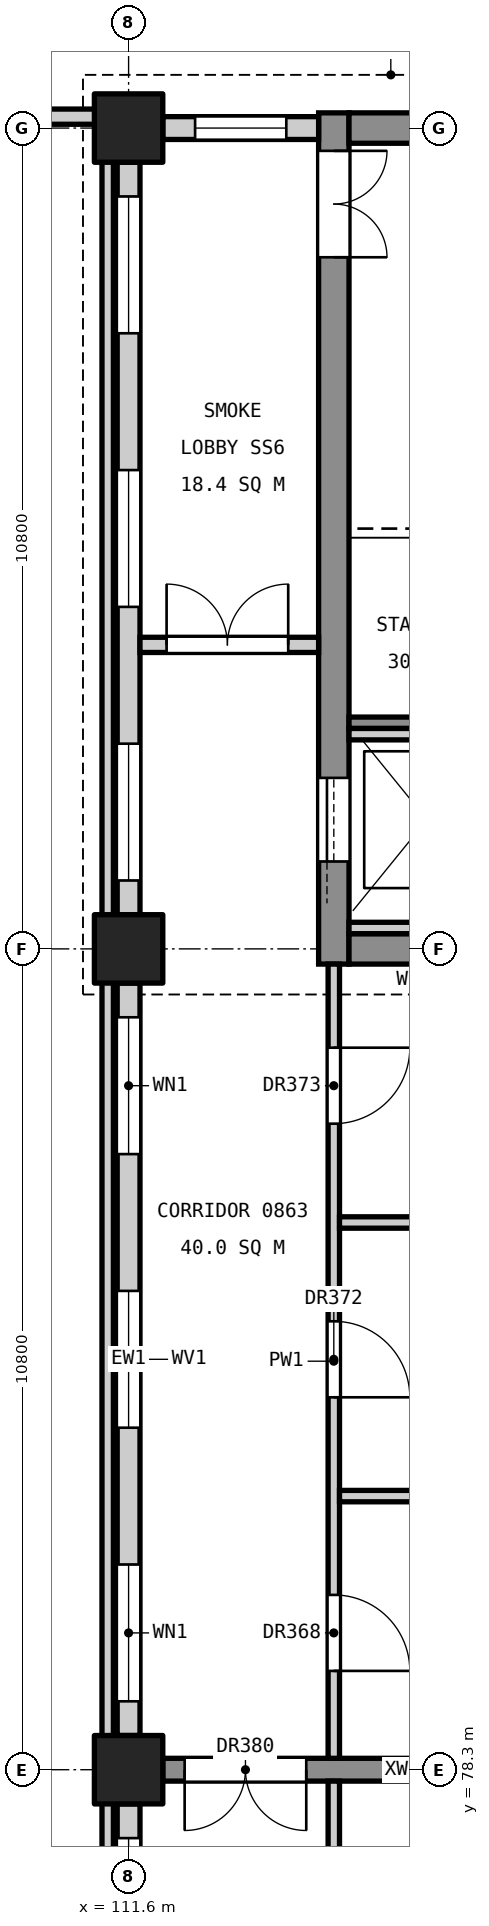
"""IFC4 building model, lengths in metres.
Left out: names, types, materials, properties, quantities, classifications, styles, units other than length and angle.
Written with IfcOpenShell. Run it as: python <this file> out.ifc"""

import sys

from ifc_helpers import new_model, si_unit, direction, frame, frame_2d, origin, origin_2d, place, context, subcontext, project, spatial, rectangle, extrude, element, fill, save


model = new_model("IFC4")
c1 = context("Model", 3, precision=1e-05, world=origin(), true_north=direction((0.0, 1.0)))
c2 = subcontext(c1, "Body", "Model", "MODEL_VIEW")
j1 = project(units=[si_unit("LENGTHUNIT", "METRE"), si_unit("PLANEANGLEUNIT", "RADIAN")], contexts=[c1])
p1 = place(None, origin())
s1 = spatial("IfcSite", under=j1, at=p1, CompositionType="ELEMENT")
p2 = place(p1, origin())
s2 = spatial("IfcBuilding", under=s1, at=p2, CompositionType="ELEMENT")
p3 = place(p2, frame((0.0, 0.0, 41.4)))
s3 = spatial("IfcBuildingStorey", under=s2, at=p3, CompositionType="ELEMENT", Elevation=41.4)
for number, where, z_axis, x_axis in (
    (1, (111.6, 78.3, 0.0), (0.0, 0.0, 1.0), (1.0, 0.0, 0.0)),
    (2, (111.6, 89.1, 0.0), (0.0, 0.0, 1.0), (1.0, 0.0, 0.0)),
    (3, (111.6, 99.9, 0.0), (0.0, 0.0, 1.0), (1.0, 0.0, 0.0)),
):
    element("IfcColumn", number, at=place(p3, frame(where, z_axis=z_axis, x_axis=x_axis)), inside=s3, PredefinedType="COLUMN", context=c2, shape_type="SweptSolid", body=[
        extrude(rectangle(XDim=0.9, YDim=0.9, at=origin_2d()), origin(), (0.0, 0.0, 1.0), 4.8),
    ])
p4 = place(p3, frame((114.3, 88.9, 0.0), z_axis=(0.0, 0.0, 1.0), x_axis=(0.0, 1.0, 0.0)))
e4 = element("IfcWall", 4, at=p4, inside=s3, PredefinedType="SHEAR", context=c2, shape_type="SweptSolid", body=[
    extrude(rectangle(XDim=11.2, YDim=0.4, at=frame_2d((5.6, 0.0))), origin(), (0.0, 0.0, 1.0), 4.55),
])
p5 = place(p4, frame((9.3, 0.0, 0.0)))
e5 = element("IfcOpeningElement", 5, at=p5, cuts=e4, PredefinedType="OPENING", context=c2, shape_type="SweptSolid", body=[
    extrude(rectangle(XDim=1.4, YDim=2.1, at=frame_2d((0.7, 1.05))), frame((0.0, 0.21, 0.0), z_axis=(0.0, -1.0, 0.0), x_axis=(1.0, 0.0, 0.0)), (0.0, 0.0, 1.0), 0.42),
])
p6 = place(p4, frame((1.35, 0.0, 0.0)))
e6 = element("IfcOpeningElement", 6, at=p6, cuts=e4, PredefinedType="OPENING", context=c2, shape_type="SweptSolid", body=[
    extrude(rectangle(XDim=1.1, YDim=2.1, at=frame_2d((0.55, 1.05))), frame((0.0, 0.21, 0.0), z_axis=(0.0, -1.0, 0.0), x_axis=(1.0, 0.0, 0.0)), (0.0, 0.0, 1.0), 0.42),
])
p7 = place(p3, frame((118.6, 89.1, 0.0), z_axis=(0.0, 0.0, 1.0), x_axis=(-1.0, 0.0, 0.0)))
e7 = element("IfcWall", 7, at=p7, inside=s3, PredefinedType="SHEAR", context=c2, shape_type="SweptSolid", body=[
    extrude(rectangle(XDim=4.1, YDim=0.4, at=frame_2d((2.05, 0.0))), origin(), (0.0, 0.0, 1.0), 4.55),
])
p8 = place(p3, frame((118.6, 99.9, 0.0), z_axis=(0.0, 0.0, 1.0), x_axis=(-1.0, 0.0, 0.0)))
e8 = element("IfcWall", 8, at=p8, inside=s3, PredefinedType="SHEAR", context=c2, shape_type="SweptSolid", body=[
    extrude(rectangle(XDim=4.1, YDim=0.4, at=frame_2d((2.05, 0.0))), origin(), (0.0, 0.0, 1.0), 4.55),
])
p9 = place(p8, frame((1.45, 0.0, 3.4)))
e9 = element("IfcOpeningElement", 9, at=p9, cuts=e8, PredefinedType="OPENING", context=c2, shape_type="SweptSolid", body=[
    extrude(rectangle(XDim=1.2, YDim=0.9, at=frame_2d((0.6, 0.45))), frame((0.0, 0.21, 0.0), z_axis=(0.0, -1.0, 0.0), x_axis=(1.0, 0.0, 0.0)), (0.0, 0.0, 1.0), 0.42),
])
p10 = place(p3, frame((118.35, 78.3, 0.0), z_axis=(0.0, 0.0, 1.0), x_axis=(-1.0, 0.0, 0.0)))
e10 = element("IfcWall", 10, at=p10, inside=s3, PredefinedType="SHEAR", context=c2, shape_type="SweptSolid", body=[
    extrude(rectangle(XDim=6.3, YDim=0.3, at=frame_2d((3.15, 0.0))), origin(), (0.0, 0.0, 1.0), 4.55),
])
p11 = place(p10, frame((4.413, 0.0, 0.0)))
e11 = element("IfcOpeningElement", 11, at=p11, cuts=e10, PredefinedType="OPENING", context=c2, shape_type="SweptSolid", body=[
    extrude(rectangle(XDim=1.6, YDim=2.1, at=frame_2d((0.8, 1.05))), frame((0.0, 0.16, 0.0), z_axis=(0.0, -1.0, 0.0), x_axis=(1.0, 0.0, 0.0)), (0.0, 0.0, 1.0), 0.32),
])
p12 = place(p3, frame((118.6, 92.075, 0.0), z_axis=(0.0, 0.0, 1.0), x_axis=(-1.0, 0.0, 0.0)))
e12 = element("IfcWall", 12, at=p12, inside=s3, PredefinedType="SOLIDWALL", context=c2, shape_type="SweptSolid", body=[
    extrude(rectangle(XDim=4.1, YDim=0.15, at=frame_2d((2.05, 0.0))), origin(), (0.0, 0.0, 1.0), 4.55),
])
for number, where, z_axis, x_axis in (
    (13, (116.35, 91.925, 0.0), (0.0, 0.0, 1.0), (-1.0, 0.0, 0.0)),
    (14, (116.35, 89.375, 0.0), (0.0, 0.0, 1.0), (-1.0, 0.0, 0.0)),
):
    element("IfcWall", number, at=place(p3, frame(where, z_axis=z_axis, x_axis=x_axis)), inside=s3, PredefinedType="SOLIDWALL", context=c2, shape_type="SweptSolid", body=[
        extrude(rectangle(XDim=1.85, YDim=0.15, at=frame_2d((0.925, 0.0))), origin(), (0.0, 0.0, 1.0), 4.55),
    ])
p13 = place(p3, frame((100.45, 100.05, 0.0), z_axis=(0.0, 0.0, 1.0), x_axis=(1.0, 0.0, 0.0)))
e15 = element("IfcWall", 15, at=p13, inside=s3, PredefinedType="PARAPET", context=c2, shape_type="SweptSolid", body=[
    extrude(rectangle(XDim=10.8, YDim=0.2, at=frame_2d((5.4, 0.0))), origin(), (0.0, 0.0, 1.0), 1.1),
])
p14 = place(p3, frame((111.325, 35.05, 0.0), z_axis=(0.0, 0.0, 1.0), x_axis=(0.0, 1.0, 0.0)))
e16 = element("IfcWall", 16, at=p14, inside=s3, PredefinedType="PARAPET", context=c2, shape_type="SweptSolid", body=[
    extrude(rectangle(XDim=64.9, YDim=0.15, at=frame_2d((32.45, 0.0))), origin(), (0.0, 0.0, 1.0), 0.3),
])
p15 = place(p3, frame((114.1, 99.9, 0.0), z_axis=(0.0, 0.0, 1.0), x_axis=(-1.0, 0.0, 0.0)))
e17 = element("IfcWall", 17, at=p15, inside=s3, PredefinedType="STANDARD", context=c2, shape_type="SweptSolid", body=[
    extrude(rectangle(XDim=2.05, YDim=0.3, at=frame_2d((1.025, 0.0))), origin(), (0.0, 0.0, 1.0), 3.85),
])
p16 = place(p15, frame((0.425, 0.0, 0.9)))
e18 = element("IfcOpeningElement", 18, at=p16, cuts=e17, PredefinedType="OPENING", context=c2, shape_type="SweptSolid", body=[
    extrude(rectangle(XDim=1.2, YDim=2.4, at=frame_2d((0.6, 1.2))), frame((0.0, 0.16, 0.0), z_axis=(0.0, -1.0, 0.0), x_axis=(1.0, 0.0, 0.0)), (0.0, 0.0, 1.0), 0.32),
])
p17 = place(p3, frame((111.6, 67.95, 0.0), z_axis=(0.0, 0.0, 1.0), x_axis=(0.0, 1.0, 0.0)))
e19 = element("IfcWall", 19, at=p17, inside=s3, PredefinedType="STANDARD", context=c2, shape_type="SweptSolid", body=[
    extrude(rectangle(XDim=9.9, YDim=0.3, at=frame_2d((4.95, 0.0))), origin(), (0.0, 0.0, 1.0), 3.55),
])
p18 = place(p17, frame((0.45, 0.0, 0.9)))
e20 = element("IfcOpeningElement", 20, at=p18, cuts=e19, PredefinedType="OPENING", context=c2, shape_type="SweptSolid", body=[
    extrude(rectangle(XDim=1.8, YDim=2.4, at=frame_2d((0.9, 1.2))), frame((0.0, 0.16, 0.0), z_axis=(0.0, -1.0, 0.0), x_axis=(1.0, 0.0, 0.0)), (0.0, 0.0, 1.0), 0.32),
])
p19 = place(p17, frame((7.65, 0.0, 0.9)))
e21 = element("IfcOpeningElement", 21, at=p19, cuts=e19, PredefinedType="OPENING", context=c2, shape_type="SweptSolid", body=[
    extrude(rectangle(XDim=1.8, YDim=2.4, at=frame_2d((0.9, 1.2))), frame((0.0, 0.16, 0.0), z_axis=(0.0, -1.0, 0.0), x_axis=(1.0, 0.0, 0.0)), (0.0, 0.0, 1.0), 0.32),
])
p20 = place(p17, frame((6.25, 0.0, 0.0)))
e22 = element("IfcOpeningElement", 22, at=p20, cuts=e19, PredefinedType="OPENING", context=c2, shape_type="SweptSolid", body=[
    extrude(rectangle(XDim=1.0, YDim=2.1, at=frame_2d((0.5, 1.05))), frame((0.0, 0.16, 0.0), z_axis=(0.0, -1.0, 0.0), x_axis=(1.0, 0.0, 0.0)), (0.0, 0.0, 1.0), 0.32),
])
p21 = place(p3, frame((111.6, 78.75, 0.0), z_axis=(0.0, 0.0, 1.0), x_axis=(0.0, 1.0, 0.0)))
e23 = element("IfcWall", 23, at=p21, inside=s3, PredefinedType="STANDARD", context=c2, shape_type="SweptSolid", body=[
    extrude(rectangle(XDim=9.9, YDim=0.3, at=frame_2d((4.95, 0.0))), origin(), (0.0, 0.0, 1.0), 3.55),
])
p22 = place(p21, frame((0.45, 0.0, 0.9)))
e24 = element("IfcOpeningElement", 24, at=p22, cuts=e23, PredefinedType="OPENING", context=c2, shape_type="SweptSolid", body=[
    extrude(rectangle(XDim=1.8, YDim=2.4, at=frame_2d((0.9, 1.2))), frame((0.0, 0.16, 0.0), z_axis=(0.0, -1.0, 0.0), x_axis=(1.0, 0.0, 0.0)), (0.0, 0.0, 1.0), 0.32),
])
p23 = place(p21, frame((4.05, 0.0, 0.9)))
e25 = element("IfcOpeningElement", 25, at=p23, cuts=e23, PredefinedType="OPENING", context=c2, shape_type="SweptSolid", body=[
    extrude(rectangle(XDim=1.8, YDim=2.4, at=frame_2d((0.9, 1.2))), frame((0.0, 0.16, 0.0), z_axis=(0.0, -1.0, 0.0), x_axis=(1.0, 0.0, 0.0)), (0.0, 0.0, 1.0), 0.32),
])
p24 = place(p21, frame((7.65, 0.0, 0.9)))
e26 = element("IfcOpeningElement", 26, at=p24, cuts=e23, PredefinedType="OPENING", context=c2, shape_type="SweptSolid", body=[
    extrude(rectangle(XDim=1.8, YDim=2.4, at=frame_2d((0.9, 1.2))), frame((0.0, 0.16, 0.0), z_axis=(0.0, -1.0, 0.0), x_axis=(1.0, 0.0, 0.0)), (0.0, 0.0, 1.0), 0.32),
])
p25 = place(p3, frame((111.6, 89.55, 0.0), z_axis=(0.0, 0.0, 1.0), x_axis=(0.0, 1.0, 0.0)))
e27 = element("IfcWall", 27, at=p25, inside=s3, PredefinedType="STANDARD", context=c2, shape_type="SweptSolid", body=[
    extrude(rectangle(XDim=9.9, YDim=0.3, at=frame_2d((4.95, 0.0))), origin(), (0.0, 0.0, 1.0), 3.55),
])
p26 = place(p25, frame((0.45, 0.0, 0.9)))
e28 = element("IfcOpeningElement", 28, at=p26, cuts=e27, PredefinedType="OPENING", context=c2, shape_type="SweptSolid", body=[
    extrude(rectangle(XDim=1.8, YDim=2.4, at=frame_2d((0.9, 1.2))), frame((0.0, 0.16, 0.0), z_axis=(0.0, -1.0, 0.0), x_axis=(1.0, 0.0, 0.0)), (0.0, 0.0, 1.0), 0.32),
])
p27 = place(p25, frame((4.05, 0.0, 0.9)))
e29 = element("IfcOpeningElement", 29, at=p27, cuts=e27, PredefinedType="OPENING", context=c2, shape_type="SweptSolid", body=[
    extrude(rectangle(XDim=1.8, YDim=2.4, at=frame_2d((0.9, 1.2))), frame((0.0, 0.16, 0.0), z_axis=(0.0, -1.0, 0.0), x_axis=(1.0, 0.0, 0.0)), (0.0, 0.0, 1.0), 0.32),
])
p28 = place(p25, frame((7.65, 0.0, 0.9)))
e30 = element("IfcOpeningElement", 30, at=p28, cuts=e27, PredefinedType="OPENING", context=c2, shape_type="SweptSolid", body=[
    extrude(rectangle(XDim=1.8, YDim=2.4, at=frame_2d((0.9, 1.2))), frame((0.0, 0.16, 0.0), z_axis=(0.0, -1.0, 0.0), x_axis=(1.0, 0.0, 0.0)), (0.0, 0.0, 1.0), 0.32),
])
p29 = place(p3, frame((114.3, 74.9, 0.0), z_axis=(0.0, 0.0, 1.0), x_axis=(0.0, 1.0, 0.0)))
e31 = element("IfcWall", 31, at=p29, inside=s3, PredefinedType="PARTITIONING", context=c2, shape_type="SweptSolid", body=[
    extrude(rectangle(XDim=3.25, YDim=0.15, at=frame_2d((1.625, 0.0))), origin(), (0.0, 0.0, 1.0), 3.55),
])
p30 = place(p29, frame((1.1, 0.0, 0.0)))
e32 = element("IfcOpeningElement", 32, at=p30, cuts=e31, PredefinedType="OPENING", context=c2, shape_type="SweptSolid", body=[
    extrude(rectangle(XDim=1.0, YDim=2.1, at=frame_2d((0.5, 1.05))), frame((0.0, 0.085, 0.0), z_axis=(0.0, -1.0, 0.0), x_axis=(1.0, 0.0, 0.0)), (0.0, 0.0, 1.0), 0.17),
])
p31 = place(p3, frame((114.3, 78.45, 0.0), z_axis=(0.0, 0.0, 1.0), x_axis=(0.0, 1.0, 0.0)))
e33 = element("IfcWall", 33, at=p31, inside=s3, PredefinedType="PARTITIONING", context=c2, shape_type="SweptSolid", body=[
    extrude(rectangle(XDim=10.45, YDim=0.15, at=frame_2d((5.225, 0.0))), origin(), (0.0, 0.0, 1.0), 3.55),
])
p32 = place(p31, frame((1.15, 0.0, 0.0)))
e34 = element("IfcOpeningElement", 34, at=p32, cuts=e33, PredefinedType="OPENING", context=c2, shape_type="SweptSolid", body=[
    extrude(rectangle(XDim=1.0, YDim=2.1, at=frame_2d((0.5, 1.05))), frame((0.0, 0.085, 0.0), z_axis=(0.0, -1.0, 0.0), x_axis=(1.0, 0.0, 0.0)), (0.0, 0.0, 1.0), 0.17),
])
p33 = place(p31, frame((4.75, 0.0, 0.0)))
e35 = element("IfcOpeningElement", 35, at=p33, cuts=e33, PredefinedType="OPENING", context=c2, shape_type="SweptSolid", body=[
    extrude(rectangle(XDim=1.0, YDim=2.1, at=frame_2d((0.5, 1.05))), frame((0.0, 0.085, 0.0), z_axis=(0.0, -1.0, 0.0), x_axis=(1.0, 0.0, 0.0)), (0.0, 0.0, 1.0), 0.17),
])
p34 = place(p31, frame((8.35, 0.0, 0.0)))
e36 = element("IfcOpeningElement", 36, at=p34, cuts=e33, PredefinedType="OPENING", context=c2, shape_type="SweptSolid", body=[
    extrude(rectangle(XDim=1.0, YDim=2.1, at=frame_2d((0.5, 1.05))), frame((0.0, 0.085, 0.0), z_axis=(0.0, -1.0, 0.0), x_axis=(1.0, 0.0, 0.0)), (0.0, 0.0, 1.0), 0.17),
])
for number, where, z_axis, x_axis in (
    (37, (118.65, 81.9, 0.0), (0.0, 0.0, 1.0), (-1.0, 0.0, 0.0)),
    (38, (118.65, 85.5, 0.0), (0.0, 0.0, 1.0), (-1.0, 0.0, 0.0)),
):
    element("IfcWall", number, at=place(p3, frame(where, z_axis=z_axis, x_axis=x_axis)), inside=s3, PredefinedType="PARTITIONING", context=c2, shape_type="SweptSolid", body=[
        extrude(rectangle(XDim=4.275, YDim=0.15, at=frame_2d((2.137, 0.0))), origin(), (0.0, 0.0, 1.0), 3.85),
    ])
p35 = place(p3, frame((114.1, 93.1, 0.0), z_axis=(0.0, 0.0, 1.0), x_axis=(-1.0, 0.0, 0.0)))
e39 = element("IfcWall", 39, at=p35, inside=s3, PredefinedType="PARTITIONING", context=c2, shape_type="SweptSolid", body=[
    extrude(rectangle(XDim=2.35, YDim=0.2, at=frame_2d((1.175, 0.0))), origin(), (0.0, 0.0, 1.0), 3.55),
])
p36 = place(p35, frame((0.4, 0.0, 0.0)))
e40 = element("IfcOpeningElement", 40, at=p36, cuts=e39, PredefinedType="OPENING", context=c2, shape_type="SweptSolid", body=[
    extrude(rectangle(XDim=1.6, YDim=2.1, at=frame_2d((0.8, 1.05))), frame((0.0, 0.11, 0.0), z_axis=(0.0, -1.0, 0.0), x_axis=(1.0, 0.0, 0.0)), (0.0, 0.0, 1.0), 0.22),
])
p37 = place(p5, frame((1.4, 0.0, 0.0), z_axis=(0.0, 0.0, 1.0), x_axis=(-1.0, 0.0, 0.0)))
e41 = element("IfcDoor", 41, at=p37, inside=s3, OperationType="DOUBLE_DOOR_SINGLE_SWING", PredefinedType="DOOR", context=c2, shape_type="SweptSolid", body=[
    extrude(rectangle(XDim=1.4, YDim=2.1, at=frame_2d((0.7, 1.05))), frame((0.0, 0.025, 0.0), z_axis=(0.0, -1.0, 0.0), x_axis=(1.0, 0.0, 0.0)), (0.0, 0.0, 1.0), 0.05),
])
fill(e5, e41)
p38 = place(p6, origin())
e42 = element("IfcDoor", 42, at=p38, inside=s3, OperationType="SLIDING_TO_LEFT", PredefinedType="DOOR", context=c2, shape_type="SweptSolid", body=[
    extrude(rectangle(XDim=1.1, YDim=2.1, at=frame_2d((0.55, 1.05))), frame((0.0, 0.025, 0.0), z_axis=(0.0, -1.0, 0.0), x_axis=(1.0, 0.0, 0.0)), (0.0, 0.0, 1.0), 0.05),
])
fill(e6, e42)
p39 = place(p16, origin())
e43 = element("IfcWindow", 43, at=p39, inside=s3, PartitioningType="SINGLE_PANEL", PredefinedType="WINDOW", context=c2, shape_type="SweptSolid", body=[
    extrude(rectangle(XDim=1.2, YDim=2.4, at=frame_2d((0.6, 1.2))), frame((0.0, 0.03, 0.0), z_axis=(0.0, -1.0, 0.0), x_axis=(1.0, 0.0, 0.0)), (0.0, 0.0, 1.0), 0.06),
])
fill(e18, e43)
p40 = place(p19, origin())
e44 = element("IfcWindow", 44, at=p40, inside=s3, PartitioningType="SINGLE_PANEL", PredefinedType="WINDOW", context=c2, shape_type="SweptSolid", body=[
    extrude(rectangle(XDim=1.8, YDim=2.4, at=frame_2d((0.9, 1.2))), frame((0.0, 0.03, 0.0), z_axis=(0.0, -1.0, 0.0), x_axis=(1.0, 0.0, 0.0)), (0.0, 0.0, 1.0), 0.06),
])
fill(e21, e44)
p41 = place(p22, origin())
e45 = element("IfcWindow", 45, at=p41, inside=s3, PartitioningType="SINGLE_PANEL", PredefinedType="WINDOW", context=c2, shape_type="SweptSolid", body=[
    extrude(rectangle(XDim=1.8, YDim=2.4, at=frame_2d((0.9, 1.2))), frame((0.0, 0.03, 0.0), z_axis=(0.0, -1.0, 0.0), x_axis=(1.0, 0.0, 0.0)), (0.0, 0.0, 1.0), 0.06),
])
fill(e24, e45)
p42 = place(p23, origin())
e46 = element("IfcWindow", 46, at=p42, inside=s3, PartitioningType="SINGLE_PANEL", PredefinedType="WINDOW", context=c2, shape_type="SweptSolid", body=[
    extrude(rectangle(XDim=1.8, YDim=2.4, at=frame_2d((0.9, 1.2))), frame((0.0, 0.03, 0.0), z_axis=(0.0, -1.0, 0.0), x_axis=(1.0, 0.0, 0.0)), (0.0, 0.0, 1.0), 0.06),
])
fill(e25, e46)
p43 = place(p24, origin())
e47 = element("IfcWindow", 47, at=p43, inside=s3, PartitioningType="SINGLE_PANEL", PredefinedType="WINDOW", context=c2, shape_type="SweptSolid", body=[
    extrude(rectangle(XDim=1.8, YDim=2.4, at=frame_2d((0.9, 1.2))), frame((0.0, 0.03, 0.0), z_axis=(0.0, -1.0, 0.0), x_axis=(1.0, 0.0, 0.0)), (0.0, 0.0, 1.0), 0.06),
])
fill(e26, e47)
p44 = place(p26, origin())
e48 = element("IfcWindow", 48, at=p44, inside=s3, PartitioningType="SINGLE_PANEL", PredefinedType="WINDOW", context=c2, shape_type="SweptSolid", body=[
    extrude(rectangle(XDim=1.8, YDim=2.4, at=frame_2d((0.9, 1.2))), frame((0.0, 0.03, 0.0), z_axis=(0.0, -1.0, 0.0), x_axis=(1.0, 0.0, 0.0)), (0.0, 0.0, 1.0), 0.06),
])
fill(e28, e48)
p45 = place(p27, origin())
e49 = element("IfcWindow", 49, at=p45, inside=s3, PartitioningType="SINGLE_PANEL", PredefinedType="WINDOW", context=c2, shape_type="SweptSolid", body=[
    extrude(rectangle(XDim=1.8, YDim=2.4, at=frame_2d((0.9, 1.2))), frame((0.0, 0.03, 0.0), z_axis=(0.0, -1.0, 0.0), x_axis=(1.0, 0.0, 0.0)), (0.0, 0.0, 1.0), 0.06),
])
fill(e29, e49)
p46 = place(p28, origin())
e50 = element("IfcWindow", 50, at=p46, inside=s3, PartitioningType="SINGLE_PANEL", PredefinedType="WINDOW", context=c2, shape_type="SweptSolid", body=[
    extrude(rectangle(XDim=1.8, YDim=2.4, at=frame_2d((0.9, 1.2))), frame((0.0, 0.03, 0.0), z_axis=(0.0, -1.0, 0.0), x_axis=(1.0, 0.0, 0.0)), (0.0, 0.0, 1.0), 0.06),
])
fill(e30, e50)
p47 = place(p32, frame((1.0, 0.0, 0.0), z_axis=(0.0, 0.0, 1.0), x_axis=(-1.0, 0.0, 0.0)))
e51 = element("IfcDoor", 51, at=p47, inside=s3, OperationType="SINGLE_SWING_RIGHT", PredefinedType="DOOR", context=c2, shape_type="SweptSolid", body=[
    extrude(rectangle(XDim=1.0, YDim=2.1, at=frame_2d((0.5, 1.05))), frame((0.0, 0.025, 0.0), z_axis=(0.0, -1.0, 0.0), x_axis=(1.0, 0.0, 0.0)), (0.0, 0.0, 1.0), 0.05),
])
fill(e34, e51)
p48 = place(p33, frame((1.0, 0.0, 0.0), z_axis=(0.0, 0.0, 1.0), x_axis=(-1.0, 0.0, 0.0)))
e52 = element("IfcDoor", 52, at=p48, inside=s3, OperationType="SINGLE_SWING_RIGHT", PredefinedType="DOOR", context=c2, shape_type="SweptSolid", body=[
    extrude(rectangle(XDim=1.0, YDim=2.1, at=frame_2d((0.5, 1.05))), frame((0.0, 0.025, 0.0), z_axis=(0.0, -1.0, 0.0), x_axis=(1.0, 0.0, 0.0)), (0.0, 0.0, 1.0), 0.05),
])
fill(e35, e52)
p49 = place(p34, frame((1.0, 0.0, 0.0), z_axis=(0.0, 0.0, 1.0), x_axis=(-1.0, 0.0, 0.0)))
e53 = element("IfcDoor", 53, at=p49, inside=s3, OperationType="SINGLE_SWING_LEFT", PredefinedType="DOOR", context=c2, shape_type="SweptSolid", body=[
    extrude(rectangle(XDim=1.0, YDim=2.1, at=frame_2d((0.5, 1.05))), frame((0.0, 0.025, 0.0), z_axis=(0.0, -1.0, 0.0), x_axis=(1.0, 0.0, 0.0)), (0.0, 0.0, 1.0), 0.05),
])
fill(e36, e53)
p50 = place(p36, frame((1.6, 0.0, 0.0), z_axis=(0.0, 0.0, 1.0), x_axis=(-1.0, 0.0, 0.0)))
e54 = element("IfcDoor", 54, at=p50, inside=s3, OperationType="DOUBLE_DOOR_SINGLE_SWING", PredefinedType="DOOR", context=c2, shape_type="SweptSolid", body=[
    extrude(rectangle(XDim=1.6, YDim=2.1, at=frame_2d((0.8, 1.05))), frame((0.0, 0.025, 0.0), z_axis=(0.0, -1.0, 0.0), x_axis=(1.0, 0.0, 0.0)), (0.0, 0.0, 1.0), 0.05),
])
fill(e40, e54)
p51 = place(p11, origin())
e55 = element("IfcDoor", 55, at=p51, inside=s3, OperationType="DOUBLE_DOOR_SINGLE_SWING", PredefinedType="DOOR", context=c2, shape_type="SweptSolid", body=[
    extrude(rectangle(XDim=1.6, YDim=2.1, at=frame_2d((0.8, 1.05))), frame((0.0, 0.025, 0.0), z_axis=(0.0, -1.0, 0.0), x_axis=(1.0, 0.0, 0.0)), (0.0, 0.0, 1.0), 0.05),
])
fill(e11, e55)
save(model, sys.argv[1])
